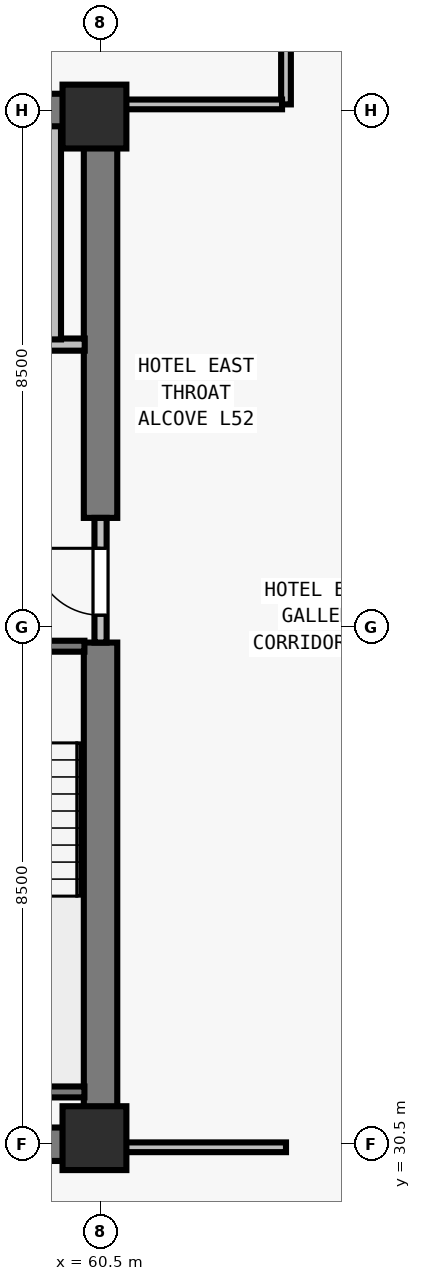
"""IFC4 building model, lengths in metres.
Left out: names, types, materials, properties, quantities, classifications, styles, units other than length and angle.
Written with IfcOpenShell. Run it as: python <this file> out.ifc"""

import sys

from ifc_helpers import new_model, si_unit, direction, frame, frame_2d, origin, origin_2d, place, context, subcontext, project, spatial, rectangle, extrude, element, fill, save


model = new_model("IFC4")
c1 = context("Model", 3, precision=1e-05, world=origin(), true_north=direction((0.0, 1.0)))
c2 = subcontext(c1, "Body", "Model", "MODEL_VIEW")
j1 = project(units=[si_unit("LENGTHUNIT", "METRE"), si_unit("PLANEANGLEUNIT", "RADIAN")], contexts=[c1])
p1 = place(None, origin())
s1 = spatial("IfcSite", under=j1, at=p1, CompositionType="ELEMENT")
p2 = place(p1, origin())
s2 = spatial("IfcBuilding", under=s1, at=p2, CompositionType="ELEMENT")
p3 = place(p2, frame((0.0, 0.0, 190.0)))
s3 = spatial("IfcBuildingStorey", under=s2, at=p3, CompositionType="ELEMENT", Elevation=190.0)
for number, where, z_axis, x_axis in (
    (1, (60.4, 30.6, 0.0), (0.0, 0.0, 1.0), (1.0, 0.0, 0.0)),
    (2, (60.4, 47.4, 0.0), (0.0, 0.0, 1.0), (1.0, 0.0, 0.0)),
):
    element("IfcColumn", number, at=place(p3, frame(where, z_axis=z_axis, x_axis=x_axis)), inside=s3, PredefinedType="COLUMN", context=c2, shape_type="SweptSolid", body=[
        extrude(rectangle(XDim=1.05, YDim=1.05, at=origin_2d()), origin(), (0.0, 0.0, 1.0), 3.5),
    ])
for number, where, z_axis, x_axis in (
    (3, (43.225, 30.5, 0.0), (0.0, 0.0, 1.0), (1.0, 0.0, 0.0)),
    (4, (43.225, 47.5, 0.0), (0.0, 0.0, 1.0), (1.0, 0.0, 0.0)),
):
    element("IfcWall", number, at=place(p3, frame(where, z_axis=z_axis, x_axis=x_axis)), inside=s3, PredefinedType="SHEAR", context=c2, shape_type="SweptSolid", body=[
        extrude(rectangle(XDim=17.55, YDim=0.55, at=frame_2d((8.775, 0.0))), origin(), (0.0, 0.0, 1.0), 3.24),
    ])
p4 = place(p3, frame((60.5, 30.765, 0.0), z_axis=(0.0, 0.0, 1.0), x_axis=(0.0, 1.0, 0.0)))
e5 = element("IfcWall", 5, at=p4, inside=s3, PredefinedType="SHEAR", context=c2, shape_type="SweptSolid", body=[
    extrude(rectangle(XDim=7.985, YDim=0.55, at=frame_2d((3.993, 0.0))), origin(), (0.0, 0.0, 1.0), 3.24),
])
p5 = place(p3, frame((60.5, 40.8, 0.0), z_axis=(0.0, 0.0, 1.0), x_axis=(0.0, 1.0, 0.0)))
e6 = element("IfcWall", 6, at=p5, inside=s3, PredefinedType="SHEAR", context=c2, shape_type="SweptSolid", body=[
    extrude(rectangle(XDim=6.435, YDim=0.55, at=frame_2d((3.218, 0.0))), origin(), (0.0, 0.0, 1.0), 3.24),
])
p6 = place(p3, frame((60.5, 38.75, 0.0), z_axis=(0.0, 0.0, 1.0), x_axis=(0.0, 1.0, 0.0)))
e7 = element("IfcWall", 7, at=p6, inside=s3, PredefinedType="SOLIDWALL", context=c2, shape_type="SweptSolid", body=[
    extrude(rectangle(XDim=2.05, YDim=0.2, at=frame_2d((1.025, 0.0))), origin(), (0.0, 0.0, 1.0), 3.24),
])
p7 = place(p6, frame((0.45, 0.0, 0.0)))
e8 = element("IfcOpeningElement", 8, at=p7, cuts=e7, PredefinedType="OPENING", context=c2, shape_type="SweptSolid", body=[
    extrude(rectangle(XDim=1.1, YDim=2.15, at=frame_2d((0.55, 1.075))), frame((0.0, 0.11, 0.0), z_axis=(0.0, -1.0, 0.0), x_axis=(1.0, 0.0, 0.0)), (0.0, 0.0, 1.0), 0.22),
])
p8 = place(p3, frame((56.735, 43.65, 0.0), z_axis=(0.0, 0.0, 1.0), x_axis=(1.0, 0.0, 0.0)))
e9 = element("IfcWall", 9, at=p8, inside=s3, PredefinedType="SOLIDWALL", context=c2, shape_type="SweptSolid", body=[
    extrude(rectangle(XDim=3.505, YDim=0.2, at=frame_2d((1.752, 0.0))), origin(), (0.0, 0.0, 1.0), 3.24),
])
p9 = place(p8, frame((1.295, 0.0, 0.0)))
e10 = element("IfcOpeningElement", 10, at=p9, cuts=e9, PredefinedType="OPENING", context=c2, shape_type="SweptSolid", body=[
    extrude(rectangle(XDim=1.1, YDim=2.2, at=frame_2d((0.55, 1.1))), frame((0.0, 0.11, 0.0), z_axis=(0.0, -1.0, 0.0), x_axis=(1.0, 0.0, 0.0)), (0.0, 0.0, 1.0), 0.22),
])
p10 = place(p3, frame((59.75, 43.735, 0.0), z_axis=(0.0, 0.0, 1.0), x_axis=(0.0, 1.0, 0.0)))
e11 = element("IfcWall", 11, at=p10, inside=s3, PredefinedType="SOLIDWALL", context=c2, shape_type="SweptSolid", body=[
    extrude(rectangle(XDim=3.505, YDim=0.2, at=frame_2d((1.752, 0.0))), origin(), (0.0, 0.0, 1.0), 3.24),
])
p11 = place(p3, frame((63.55, 47.6, 0.0), z_axis=(0.0, 0.0, 1.0), x_axis=(0.0, 1.0, 0.0)))
e12 = element("IfcWall", 12, at=p11, inside=s3, PredefinedType="PARTITIONING", context=c2, shape_type="SweptSolid", body=[
    extrude(rectangle(XDim=15.075, YDim=0.16, at=frame_2d((7.538, 0.0))), origin(), (0.0, 0.0, 1.0), 2.515),
])
p12 = place(p11, frame((1.6, 0.0, 0.0)))
e13 = element("IfcOpeningElement", 13, at=p12, cuts=e12, PredefinedType="OPENING", context=c2, shape_type="SweptSolid", body=[
    extrude(rectangle(XDim=0.92, YDim=2.12, at=frame_2d((0.46, 1.06))), frame((0.0, 0.09, 0.0), z_axis=(0.0, -1.0, 0.0), x_axis=(1.0, 0.0, 0.0)), (0.0, 0.0, 1.0), 0.18),
])
p13 = place(p11, frame((6.2, 0.0, 0.0)))
e14 = element("IfcOpeningElement", 14, at=p13, cuts=e12, PredefinedType="OPENING", context=c2, shape_type="SweptSolid", body=[
    extrude(rectangle(XDim=0.96, YDim=2.12, at=frame_2d((0.48, 1.06))), frame((0.0, 0.09, 0.0), z_axis=(0.0, -1.0, 0.0), x_axis=(1.0, 0.0, 0.0)), (0.0, 0.0, 1.0), 0.18),
])
p14 = place(p3, frame((60.765, 30.45, 0.0), z_axis=(0.0, 0.0, 1.0), x_axis=(1.0, 0.0, 0.0)))
e15 = element("IfcWall", 15, at=p14, inside=s3, PredefinedType="PARTITIONING", context=c2, shape_type="SweptSolid", body=[
    extrude(rectangle(XDim=2.785, YDim=0.16, at=frame_2d((1.393, 0.0))), origin(), (0.0, 0.0, 1.0), 3.24),
])
p15 = place(p3, frame((60.765, 47.6, 0.0), z_axis=(0.0, 0.0, 1.0), x_axis=(1.0, 0.0, 0.0)))
e16 = element("IfcWall", 16, at=p15, inside=s3, PredefinedType="PARTITIONING", context=c2, shape_type="SweptSolid", body=[
    extrude(rectangle(XDim=2.72, YDim=0.16, at=frame_2d((1.36, 0.0))), origin(), (0.0, 0.0, 1.0), 3.24),
])
p16 = place(p3, frame((57.005, 38.69, 0.0), z_axis=(0.0, 0.0, 1.0), x_axis=(1.0, 0.0, 0.0)))
e17 = element("IfcWall", 17, at=p16, inside=s3, PredefinedType="SOLIDWALL", context=c2, shape_type="SweptSolid", body=[
    extrude(rectangle(XDim=3.23, YDim=0.18, at=frame_2d((1.615, 0.0))), origin(), (0.0, 0.0, 1.0), 3.24),
])
p17 = place(p16, frame((1.14, 0.0, 0.0)))
e18 = element("IfcOpeningElement", 18, at=p17, cuts=e17, PredefinedType="OPENING", context=c2, shape_type="SweptSolid", body=[
    extrude(rectangle(XDim=0.95, YDim=2.15, at=frame_2d((0.475, 1.075))), frame((0.0, 0.1, 0.0), z_axis=(0.0, -1.0, 0.0), x_axis=(1.0, 0.0, 0.0)), (0.0, 0.0, 1.0), 0.2),
])
p18 = place(p3, frame((57.005, 31.36, 0.0), z_axis=(0.0, 0.0, 1.0), x_axis=(1.0, 0.0, 0.0)))
e19 = element("IfcWall", 19, at=p18, inside=s3, PredefinedType="SOLIDWALL", context=c2, shape_type="SweptSolid", body=[
    extrude(rectangle(XDim=3.23, YDim=0.18, at=frame_2d((1.615, 0.0))), origin(), (0.0, 0.0, 1.0), 3.24),
])
p19 = place(p7, origin())
e20 = element("IfcDoor", 20, at=p19, inside=s3, OperationType="SINGLE_SWING_RIGHT", PredefinedType="DOOR", context=c2, shape_type="SweptSolid", body=[
    extrude(rectangle(XDim=1.1, YDim=2.15, at=frame_2d((0.55, 1.075))), frame((0.0, 0.025, 0.0), z_axis=(0.0, -1.0, 0.0), x_axis=(1.0, 0.0, 0.0)), (0.0, 0.0, 1.0), 0.05),
])
fill(e8, e20)
save(model, sys.argv[1])
